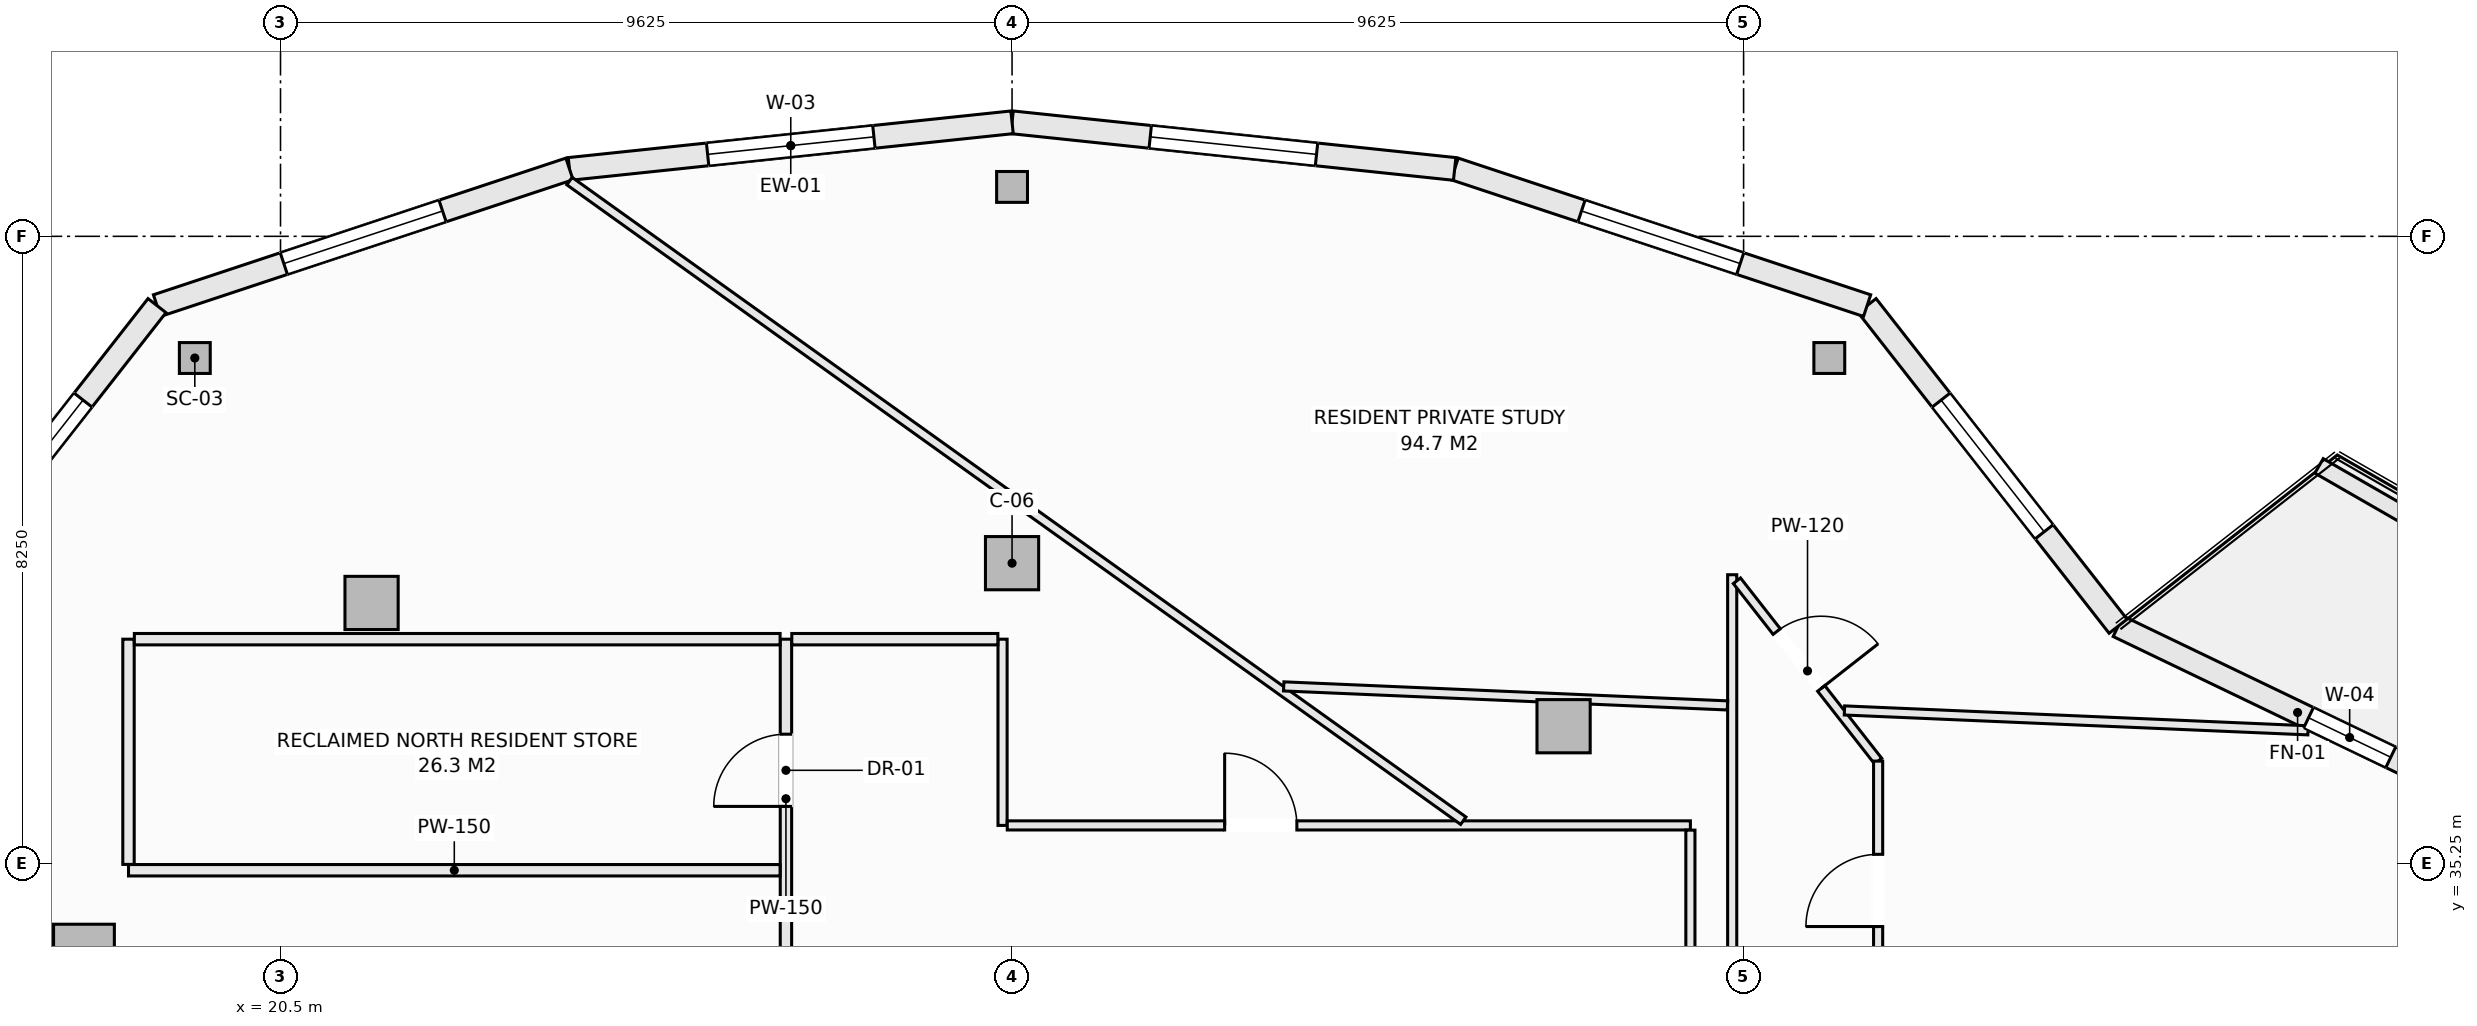
"""IFC4 building model, lengths in metres.
Left out: names, types, materials, properties, quantities, classifications, styles, units other than length and angle.
Written with IfcOpenShell. Run it as: python <this file> out.ifc"""

import sys

from ifc_helpers import new_model, si_unit, direction, frame, frame_2d, origin, origin_2d, place, context, subcontext, project, spatial, rectangle, hollow_rectangle, extrude, element, fill, save


model = new_model("IFC4")
c1 = context("Model", 3, precision=1e-05, world=origin(), true_north=direction((0.0, 1.0)))
c2 = subcontext(c1, "Body", "Model", "MODEL_VIEW")
j1 = project(units=[si_unit("LENGTHUNIT", "METRE"), si_unit("PLANEANGLEUNIT", "RADIAN")], contexts=[c1])
p1 = place(None, origin())
s1 = spatial("IfcSite", under=j1, at=p1, CompositionType="ELEMENT")
p2 = place(p1, origin())
s2 = spatial("IfcBuilding", under=s1, at=p2, CompositionType="ELEMENT")
p3 = place(p2, frame((0.0, 0.0, 249.2)))
s3 = spatial("IfcBuildingStorey", under=s2, at=p3, CompositionType="ELEMENT", Elevation=249.2)
for number, where, z_axis, x_axis in (
    (1, (40.878, 41.899, -0.27), (0.0, 0.0, 1.0), (1.0, 0.0, 0.0)),
    (2, (30.125, 44.15, -0.27), (0.0, 0.0, 1.0), (1.0, 0.0, 0.0)),
    (3, (19.372, 41.899, -0.27), (0.0, 0.0, 1.0), (1.0, 0.0, 0.0)),
):
    element("IfcColumn", number, at=place(p3, frame(where, z_axis=z_axis, x_axis=x_axis)), inside=s3, PredefinedType="COLUMN", context=c2, shape_type="SweptSolid", body=[
        extrude(hollow_rectangle(XDim=0.406, YDim=0.406, WallThickness=0.016, at=origin_2d()), origin(), (0.0, 0.0, 1.0), 3.3),
    ])
for number, where, z_axis, x_axis in (
    (4, (37.382, 37.055, -0.27), (0.0, 0.0, 1.0), (1.0, 0.0, 0.0)),
    (5, (30.125, 39.2, -0.27), (0.0, 0.0, 1.0), (1.0, 0.0, 0.0)),
    (6, (21.698, 38.677, -0.27), (0.0, 0.0, 1.0), (1.0, 0.0, 0.0)),
):
    element("IfcColumn", number, at=place(p3, frame(where, z_axis=z_axis, x_axis=x_axis)), inside=s3, PredefinedType="COLUMN", context=c2, shape_type="SweptSolid", body=[
        extrude(rectangle(XDim=0.7, YDim=0.7, at=origin_2d()), origin(), (0.0, 0.0, 1.0), 3.3),
    ])
p4 = place(p3, frame((17.914, 34.05, -0.27), z_axis=(0.0, 0.0, 1.0), x_axis=(1.0, 0.0, 0.0)))
e7 = element("IfcColumn", 7, at=p4, inside=s3, PredefinedType="PILASTER", context=c2, shape_type="SweptSolid", body=[
    extrude(rectangle(XDim=0.8, YDim=0.8, at=origin_2d()), origin(), (0.0, 0.0, 1.0), 3.3),
])
p5 = place(p3, frame((44.677, 38.37, 0.0), z_axis=(0.0, 0.0, 1.0), x_axis=(0.901355238351, -0.433080517106, 0.0)))
e8 = element("IfcWall", 8, at=p5, inside=s3, PredefinedType="SOLIDWALL", context=c2, shape_type="SweptSolid", body=[
    extrude(rectangle(XDim=5.473, YDim=0.3, at=frame_2d((2.737, 0.0))), origin(), (0.0, 0.0, 1.0), 2.605),
])
p6 = place(p5, frame((2.78, 0.0, 0.72)))
e9 = element("IfcOpeningElement", 9, at=p6, cuts=e8, PredefinedType="OPENING", context=c2, shape_type="SweptSolid", body=[
    extrude(rectangle(XDim=1.2, YDim=1.65, at=frame_2d((0.6, 0.825))), frame((0.0, 0.16, 0.0), z_axis=(0.0, -1.0, 0.0), x_axis=(1.0, 0.0, 0.0)), (0.0, 0.0, 1.0), 0.32),
])
p7 = place(p3, frame((41.375, 42.588, 0.0), z_axis=(0.0, 0.0, 1.0), x_axis=(0.61644588519, -0.787397276241, 0.0)))
e10 = element("IfcWall", 10, at=p7, inside=s3, PredefinedType="SOLIDWALL", context=c2, shape_type="SweptSolid", body=[
    extrude(rectangle(XDim=5.357, YDim=0.3, at=frame_2d((2.678, 0.0))), origin(), (0.0, 0.0, 1.0), 2.605),
])
p8 = place(p7, frame((1.579, 0.0, 0.72)))
e11 = element("IfcOpeningElement", 11, at=p8, cuts=e10, PredefinedType="OPENING", context=c2, shape_type="SweptSolid", body=[
    extrude(rectangle(XDim=2.2, YDim=1.65, at=frame_2d((1.1, 0.825))), frame((0.0, 0.16, 0.0), z_axis=(0.0, -1.0, 0.0), x_axis=(1.0, 0.0, 0.0)), (0.0, 0.0, 1.0), 0.32),
])
p9 = place(p3, frame((35.948, 44.387, 0.0), z_axis=(0.0, 0.0, 1.0), x_axis=(0.949232769585, -0.314574552605, 0.0)))
e12 = element("IfcWall", 12, at=p9, inside=s3, PredefinedType="SOLIDWALL", context=c2, shape_type="SweptSolid", body=[
    extrude(rectangle(XDim=5.717, YDim=0.3, at=frame_2d((2.858, 0.0))), origin(), (0.0, 0.0, 1.0), 2.605),
])
p10 = place(p9, frame((1.758, 0.0, 0.72)))
e13 = element("IfcOpeningElement", 13, at=p10, cuts=e12, PredefinedType="OPENING", context=c2, shape_type="SweptSolid", body=[
    extrude(rectangle(XDim=2.2, YDim=1.65, at=frame_2d((1.1, 0.825))), frame((0.0, 0.16, 0.0), z_axis=(0.0, -1.0, 0.0), x_axis=(1.0, 0.0, 0.0)), (0.0, 0.0, 1.0), 0.32),
])
p11 = place(p3, frame((30.125, 45.0, 0.0), z_axis=(0.0, 0.0, 1.0), x_axis=(0.994500425783, -0.10473253132, 0.0)))
e14 = element("IfcWall", 14, at=p11, inside=s3, PredefinedType="SOLIDWALL", context=c2, shape_type="SweptSolid", body=[
    extrude(rectangle(XDim=5.856, YDim=0.3, at=frame_2d((2.928, 0.0))), origin(), (0.0, 0.0, 1.0), 2.605),
])
p12 = place(p11, frame((1.828, 0.0, 0.72)))
e15 = element("IfcOpeningElement", 15, at=p12, cuts=e14, PredefinedType="OPENING", context=c2, shape_type="SweptSolid", body=[
    extrude(rectangle(XDim=2.2, YDim=1.65, at=frame_2d((1.1, 0.825))), frame((0.0, 0.16, 0.0), z_axis=(0.0, -1.0, 0.0), x_axis=(1.0, 0.0, 0.0)), (0.0, 0.0, 1.0), 0.32),
])
p13 = place(p3, frame((24.302, 44.387, 0.0), z_axis=(0.0, 0.0, 1.0), x_axis=(0.994500425783, 0.10473253132, 0.0)))
e16 = element("IfcWall", 16, at=p13, inside=s3, PredefinedType="SOLIDWALL", context=c2, shape_type="SweptSolid", body=[
    extrude(rectangle(XDim=5.856, YDim=0.3, at=frame_2d((2.928, 0.0))), origin(), (0.0, 0.0, 1.0), 2.605),
])
p14 = place(p13, frame((1.828, 0.0, 0.72)))
e17 = element("IfcOpeningElement", 17, at=p14, cuts=e16, PredefinedType="OPENING", context=c2, shape_type="SweptSolid", body=[
    extrude(rectangle(XDim=2.2, YDim=1.65, at=frame_2d((1.1, 0.825))), frame((0.0, 0.16, 0.0), z_axis=(0.0, -1.0, 0.0), x_axis=(1.0, 0.0, 0.0)), (0.0, 0.0, 1.0), 0.32),
])
p15 = place(p3, frame((18.875, 42.588, 0.0), z_axis=(0.0, 0.0, 1.0), x_axis=(0.949232769585, 0.314574552605, 0.0)))
e18 = element("IfcWall", 18, at=p15, inside=s3, PredefinedType="SOLIDWALL", context=c2, shape_type="SweptSolid", body=[
    extrude(rectangle(XDim=5.717, YDim=0.3, at=frame_2d((2.858, 0.0))), origin(), (0.0, 0.0, 1.0), 2.605),
])
p16 = place(p15, frame((1.758, 0.0, 0.72)))
e19 = element("IfcOpeningElement", 19, at=p16, cuts=e18, PredefinedType="OPENING", context=c2, shape_type="SweptSolid", body=[
    extrude(rectangle(XDim=2.2, YDim=1.65, at=frame_2d((1.1, 0.825))), frame((0.0, 0.16, 0.0), z_axis=(0.0, -1.0, 0.0), x_axis=(1.0, 0.0, 0.0)), (0.0, 0.0, 1.0), 0.32),
])
p17 = place(p3, frame((15.573, 38.37, 0.0), z_axis=(0.0, 0.0, 1.0), x_axis=(0.61644588519, 0.787397276241, 0.0)))
e20 = element("IfcWall", 20, at=p17, inside=s3, PredefinedType="SOLIDWALL", context=c2, shape_type="SweptSolid", body=[
    extrude(rectangle(XDim=5.357, YDim=0.3, at=frame_2d((2.678, 0.0))), origin(), (0.0, 0.0, 1.0), 2.605),
])
p18 = place(p17, frame((1.579, 0.0, 0.72)))
e21 = element("IfcOpeningElement", 21, at=p18, cuts=e20, PredefinedType="OPENING", context=c2, shape_type="SweptSolid", body=[
    extrude(rectangle(XDim=2.2, YDim=1.65, at=frame_2d((1.1, 0.825))), frame((0.0, 0.16, 0.0), z_axis=(0.0, -1.0, 0.0), x_axis=(1.0, 0.0, 0.0)), (0.0, 0.0, 1.0), 0.32),
])
p19 = place(p3, frame((47.321, 40.479, 0.0), z_axis=(0.0, 0.0, 1.0), x_axis=(0.866901621005, -0.49847926687, 0.0)))
e22 = element("IfcWall", 22, at=p19, inside=s3, PredefinedType="PARAPET", context=c2, shape_type="SweptSolid", body=[
    extrude(rectangle(XDim=6.197, YDim=0.22, at=frame_2d((3.098, 0.0))), origin(), (0.0, 0.0, 1.0), 0.52),
])
p20 = place(p3, frame((27.15, 34.002, 0.0), z_axis=(0.0, 0.0, 1.0), x_axis=(0.0, 1.0, 0.0)))
e23 = element("IfcWall", 23, at=p20, inside=s3, PredefinedType="PARTITIONING", context=c2, shape_type="SweptSolid", body=[
    extrude(rectangle(XDim=4.198, YDim=0.15, at=frame_2d((2.099, 0.0))), origin(), (0.0, 0.0, 1.0), 3.03),
])
p21 = place(p20, frame((1.998, 0.0, 0.0)))
e24 = element("IfcOpeningElement", 24, at=p21, cuts=e23, PredefinedType="OPENING", context=c2, shape_type="SweptSolid", body=[
    extrude(rectangle(XDim=0.95, YDim=2.1, at=frame_2d((0.475, 1.05))), frame((0.0, 0.085, 0.0), z_axis=(0.0, -1.0, 0.0), x_axis=(1.0, 0.0, 0.0)), (0.0, 0.0, 1.0), 0.17),
])
p22 = place(p3, frame((30.0, 35.75, 0.0), z_axis=(0.0, 0.0, 1.0), x_axis=(0.0, 1.0, 0.0)))
e25 = element("IfcWall", 25, at=p22, inside=s3, PredefinedType="PARTITIONING", context=c2, shape_type="SweptSolid", body=[
    extrude(rectangle(XDim=2.45, YDim=0.12, at=frame_2d((1.225, 0.0))), origin(), (0.0, 0.0, 1.0), 3.03),
])
p23 = place(p3, frame((18.5, 35.16, 0.0), z_axis=(0.0, 0.0, 1.0), x_axis=(1.0, 0.0, 0.0)))
e26 = element("IfcWall", 26, at=p23, inside=s3, PredefinedType="PARTITIONING", context=c2, shape_type="SweptSolid", body=[
    extrude(rectangle(XDim=8.573, YDim=0.15, at=frame_2d((4.287, 0.0))), origin(), (0.0, 0.0, 1.0), 3.03),
])
p24 = place(p3, frame((18.5, 35.237, 0.0), z_axis=(0.0, 0.0, 1.0), x_axis=(0.0, 1.0, 0.0)))
e27 = element("IfcWall", 27, at=p24, inside=s3, PredefinedType="PARTITIONING", context=c2, shape_type="SweptSolid", body=[
    extrude(rectangle(XDim=2.963, YDim=0.15, at=frame_2d((1.481, 0.0))), origin(), (0.0, 0.0, 1.0), 3.03),
])
p25 = place(p3, frame((18.577, 38.2, 0.0), z_axis=(0.0, 0.0, 1.0), x_axis=(1.0, 0.0, 0.0)))
e28 = element("IfcWall", 28, at=p25, inside=s3, PredefinedType="PARTITIONING", context=c2, shape_type="SweptSolid", body=[
    extrude(rectangle(XDim=8.496, YDim=0.15, at=frame_2d((4.248, 0.0))), origin(), (0.0, 0.0, 1.0), 3.03),
])
p26 = place(p3, frame((27.227, 38.2, 0.0), z_axis=(0.0, 0.0, 1.0), x_axis=(1.0, 0.0, 0.0)))
e29 = element("IfcWall", 29, at=p26, inside=s3, PredefinedType="PARTITIONING", context=c2, shape_type="SweptSolid", body=[
    extrude(rectangle(XDim=2.711, YDim=0.15, at=frame_2d((1.355, 0.0))), origin(), (0.0, 0.0, 1.0), 3.03),
])
p27 = place(p3, frame((30.062, 35.75, 0.0), z_axis=(0.0, 0.0, 1.0), x_axis=(1.0, 0.0, 0.0)))
e30 = element("IfcWall", 30, at=p27, inside=s3, PredefinedType="PARTITIONING", context=c2, shape_type="SweptSolid", body=[
    extrude(rectangle(XDim=8.988, YDim=0.12, at=frame_2d((4.494, 0.0))), origin(), (0.0, 0.0, 1.0), 2.478),
])
p28 = place(p27, frame((2.86, 0.0, 0.0)))
e31 = element("IfcOpeningElement", 31, at=p28, cuts=e30, PredefinedType="OPENING", context=c2, shape_type="SweptSolid", body=[
    extrude(rectangle(XDim=0.95, YDim=2.1, at=frame_2d((0.475, 1.05))), frame((0.0, 0.07, 0.0), z_axis=(0.0, -1.0, 0.0), x_axis=(1.0, 0.0, 0.0)), (0.0, 0.0, 1.0), 0.14),
])
p29 = place(p3, frame((39.05, 33.75, 0.0), z_axis=(0.0, 0.0, 1.0), x_axis=(0.0, 1.0, 0.0)))
e32 = element("IfcWall", 32, at=p29, inside=s3, PredefinedType="PARTITIONING", context=c2, shape_type="SweptSolid", body=[
    extrude(rectangle(XDim=1.938, YDim=0.12, at=frame_2d((0.969, 0.0))), origin(), (0.0, 0.0, 1.0), 3.03),
])
p30 = place(p3, frame((39.6, 31.182, 0.0), z_axis=(0.0, 0.0, 1.0), x_axis=(0.0, 1.0, 0.0)))
e33 = element("IfcWall", 33, at=p30, inside=s3, PredefinedType="PARTITIONING", context=c2, shape_type="SweptSolid", body=[
    extrude(rectangle(XDim=7.866, YDim=0.12, at=frame_2d((3.933, 0.0))), origin(), (0.0, 0.0, 1.0), 3.03),
])
p31 = place(p3, frame((39.662, 38.969, 0.0), z_axis=(0.0, 0.0, 1.0), x_axis=(0.616500468458, -0.787354540465, 0.0)))
e34 = element("IfcWall", 34, at=p31, inside=s3, PredefinedType="PARTITIONING", context=c2, shape_type="SweptSolid", body=[
    extrude(rectangle(XDim=3.014, YDim=0.12, at=frame_2d((1.507, 0.0))), origin(), (0.0, 0.0, 1.0), 3.03),
])
p32 = place(p31, frame((0.849, 0.0, 0.0)))
e35 = element("IfcOpeningElement", 35, at=p32, cuts=e34, PredefinedType="OPENING", context=c2, shape_type="SweptSolid", body=[
    extrude(rectangle(XDim=0.95, YDim=2.1, at=frame_2d((0.475, 1.05))), frame((0.0, 0.07, 0.0), z_axis=(0.0, -1.0, 0.0), x_axis=(1.0, 0.0, 0.0)), (0.0, 0.0, 1.0), 0.14),
])
p33 = place(p3, frame((41.52, 33.193, 0.0), z_axis=(0.0, 0.0, 1.0), x_axis=(0.0, 1.0, 0.0)))
e36 = element("IfcWall", 36, at=p33, inside=s3, PredefinedType="PARTITIONING", context=c2, shape_type="SweptSolid", body=[
    extrude(rectangle(XDim=3.403, YDim=0.12, at=frame_2d((1.701, 0.0))), origin(), (0.0, 0.0, 1.0), 3.03),
])
p34 = place(p33, frame((1.227, 0.0, 0.0)))
e37 = element("IfcOpeningElement", 37, at=p34, cuts=e36, PredefinedType="OPENING", context=c2, shape_type="SweptSolid", body=[
    extrude(rectangle(XDim=0.95, YDim=2.1, at=frame_2d((0.475, 1.05))), frame((0.0, 0.07, 0.0), z_axis=(0.0, -1.0, 0.0), x_axis=(1.0, 0.0, 0.0)), (0.0, 0.0, 1.0), 0.14),
])
p35 = place(p3, frame((24.302, 44.227, 0.0), z_axis=(0.0, 0.0, 1.0), x_axis=(0.813249507018, -0.581915147883, 0.0)))
e38 = element("IfcWall", 38, at=p35, inside=s3, PredefinedType="PARTITIONING", context=c2, shape_type="SweptSolid", body=[
    extrude(rectangle(XDim=14.46, YDim=0.12, at=frame_2d((7.23, 0.0))), origin(), (0.0, 0.0, 1.0), 2.478),
])
p36 = place(p3, frame((33.699, 37.579, 0.0), z_axis=(0.0, 0.0, 1.0), x_axis=(0.999081056781, -0.042860727724, 0.0)))
e39 = element("IfcWall", 39, at=p36, inside=s3, PredefinedType="PARTITIONING", context=c2, shape_type="SweptSolid", body=[
    extrude(rectangle(XDim=5.844, YDim=0.12, at=frame_2d((2.922, 0.0))), origin(), (0.0, 0.0, 1.0), 2.478),
])
p37 = place(p3, frame((41.077, 37.262, 0.0), z_axis=(0.0, 0.0, 1.0), x_axis=(0.999080744008, -0.042868017834, 0.0)))
e40 = element("IfcWall", 40, at=p37, inside=s3, PredefinedType="PARTITIONING", context=c2, shape_type="SweptSolid", body=[
    extrude(rectangle(XDim=6.105, YDim=0.12, at=frame_2d((3.053, 0.0))), origin(), (0.0, 0.0, 1.0), 2.605),
])
p38 = place(p6, origin())
e41 = element("IfcWindow", 41, at=p38, inside=s3, PartitioningType="SINGLE_PANEL", PredefinedType="WINDOW", context=c2, shape_type="SweptSolid", body=[
    extrude(rectangle(XDim=1.2, YDim=1.65, at=frame_2d((0.6, 0.825))), frame((0.0, 0.03, 0.0), z_axis=(0.0, -1.0, 0.0), x_axis=(1.0, 0.0, 0.0)), (0.0, 0.0, 1.0), 0.06),
])
fill(e9, e41)
p39 = place(p8, origin())
e42 = element("IfcWindow", 42, at=p39, inside=s3, PartitioningType="SINGLE_PANEL", PredefinedType="WINDOW", context=c2, shape_type="SweptSolid", body=[
    extrude(rectangle(XDim=2.2, YDim=1.65, at=frame_2d((1.1, 0.825))), frame((0.0, 0.03, 0.0), z_axis=(0.0, -1.0, 0.0), x_axis=(1.0, 0.0, 0.0)), (0.0, 0.0, 1.0), 0.06),
])
fill(e11, e42)
p40 = place(p10, origin())
e43 = element("IfcWindow", 43, at=p40, inside=s3, PartitioningType="SINGLE_PANEL", PredefinedType="WINDOW", context=c2, shape_type="SweptSolid", body=[
    extrude(rectangle(XDim=2.2, YDim=1.65, at=frame_2d((1.1, 0.825))), frame((0.0, 0.03, 0.0), z_axis=(0.0, -1.0, 0.0), x_axis=(1.0, 0.0, 0.0)), (0.0, 0.0, 1.0), 0.06),
])
fill(e13, e43)
p41 = place(p12, origin())
e44 = element("IfcWindow", 44, at=p41, inside=s3, PartitioningType="SINGLE_PANEL", PredefinedType="WINDOW", context=c2, shape_type="SweptSolid", body=[
    extrude(rectangle(XDim=2.2, YDim=1.65, at=frame_2d((1.1, 0.825))), frame((0.0, 0.03, 0.0), z_axis=(0.0, -1.0, 0.0), x_axis=(1.0, 0.0, 0.0)), (0.0, 0.0, 1.0), 0.06),
])
fill(e15, e44)
p42 = place(p14, origin())
e45 = element("IfcWindow", 45, at=p42, inside=s3, PartitioningType="SINGLE_PANEL", PredefinedType="WINDOW", context=c2, shape_type="SweptSolid", body=[
    extrude(rectangle(XDim=2.2, YDim=1.65, at=frame_2d((1.1, 0.825))), frame((0.0, 0.03, 0.0), z_axis=(0.0, -1.0, 0.0), x_axis=(1.0, 0.0, 0.0)), (0.0, 0.0, 1.0), 0.06),
])
fill(e17, e45)
p43 = place(p16, origin())
e46 = element("IfcWindow", 46, at=p43, inside=s3, PartitioningType="SINGLE_PANEL", PredefinedType="WINDOW", context=c2, shape_type="SweptSolid", body=[
    extrude(rectangle(XDim=2.2, YDim=1.65, at=frame_2d((1.1, 0.825))), frame((0.0, 0.03, 0.0), z_axis=(0.0, -1.0, 0.0), x_axis=(1.0, 0.0, 0.0)), (0.0, 0.0, 1.0), 0.06),
])
fill(e19, e46)
p44 = place(p18, origin())
e47 = element("IfcWindow", 47, at=p44, inside=s3, PartitioningType="SINGLE_PANEL", PredefinedType="WINDOW", context=c2, shape_type="SweptSolid", body=[
    extrude(rectangle(XDim=2.2, YDim=1.65, at=frame_2d((1.1, 0.825))), frame((0.0, 0.03, 0.0), z_axis=(0.0, -1.0, 0.0), x_axis=(1.0, 0.0, 0.0)), (0.0, 0.0, 1.0), 0.06),
])
fill(e21, e47)
p45 = place(p21, origin())
e48 = element("IfcDoor", 48, at=p45, inside=s3, OperationType="SINGLE_SWING_LEFT", PredefinedType="DOOR", context=c2, shape_type="SweptSolid", body=[
    extrude(rectangle(XDim=0.95, YDim=2.1, at=frame_2d((0.475, 1.05))), frame((0.0, 0.025, 0.0), z_axis=(0.0, -1.0, 0.0), x_axis=(1.0, 0.0, 0.0)), (0.0, 0.0, 1.0), 0.05),
])
fill(e24, e48)
p46 = place(p34, origin())
e49 = element("IfcDoor", 49, at=p46, inside=s3, OperationType="SINGLE_SWING_LEFT", PredefinedType="DOOR", context=c2, shape_type="SweptSolid", body=[
    extrude(rectangle(XDim=0.95, YDim=2.1, at=frame_2d((0.475, 1.05))), frame((0.0, 0.025, 0.0), z_axis=(0.0, -1.0, 0.0), x_axis=(1.0, 0.0, 0.0)), (0.0, 0.0, 1.0), 0.05),
])
fill(e37, e49)
p47 = place(p32, origin())
e50 = element("IfcDoor", 50, at=p47, inside=s3, OperationType="SINGLE_SWING_RIGHT", PredefinedType="DOOR", context=c2, shape_type="SweptSolid", body=[
    extrude(rectangle(XDim=0.95, YDim=2.1, at=frame_2d((0.475, 1.05))), frame((0.0, 0.025, 0.0), z_axis=(0.0, -1.0, 0.0), x_axis=(1.0, 0.0, 0.0)), (0.0, 0.0, 1.0), 0.05),
])
fill(e35, e50)
p48 = place(p28, origin())
e51 = element("IfcDoor", 51, at=p48, inside=s3, OperationType="SINGLE_SWING_LEFT", PredefinedType="DOOR", context=c2, shape_type="SweptSolid", body=[
    extrude(rectangle(XDim=0.95, YDim=2.1, at=frame_2d((0.475, 1.05))), frame((0.0, 0.025, 0.0), z_axis=(0.0, -1.0, 0.0), x_axis=(1.0, 0.0, 0.0)), (0.0, 0.0, 1.0), 0.05),
])
fill(e31, e51)
save(model, sys.argv[1])
